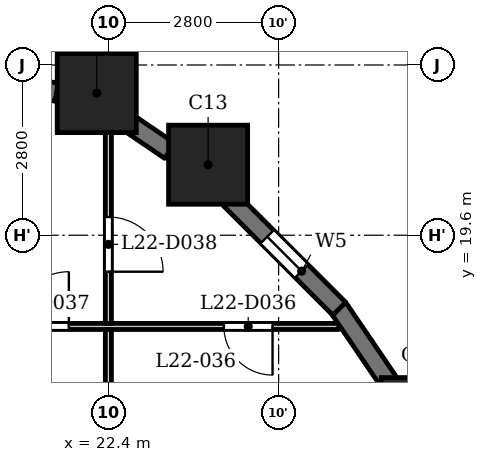
"""IFC4 building model, lengths in metres.
Left out: names, types, materials, properties, quantities, classifications, styles, units other than length and angle.
Written with IfcOpenShell. Run it as: python <this file> out.ifc"""

import sys

from ifc_helpers import new_model, si_unit, direction, frame, frame_2d, origin, origin_2d, place, context, subcontext, project, spatial, rectangle, extrude, element, fill, save


model = new_model("IFC4")
c1 = context("Model", 3, precision=1e-05, world=origin(), true_north=direction((0.0, 1.0)))
c2 = subcontext(c1, "Body", "Model", "MODEL_VIEW")
j1 = project(units=[si_unit("LENGTHUNIT", "METRE"), si_unit("PLANEANGLEUNIT", "RADIAN")], contexts=[c1])
p1 = place(None, origin())
s1 = spatial("IfcSite", under=j1, at=p1, CompositionType="ELEMENT")
p2 = place(p1, origin())
s2 = spatial("IfcBuilding", under=s1, at=p2, CompositionType="ELEMENT")
p3 = place(p2, frame((0.0, 0.0, 90.3)))
s3 = spatial("IfcBuildingStorey", under=s2, at=p3, CompositionType="ELEMENT", Elevation=90.3)
for number, where, z_axis, x_axis in (
    (1, (27.538, 16.609, 0.0), (0.0, 0.0, 1.0), (1.0, 0.0, 0.0)),
    (2, (24.04, 20.76, 0.0), (0.0, 0.0, 1.0), (1.0, 0.0, 0.0)),
    (3, (22.209, 21.938, 0.0), (0.0, 0.0, 1.0), (1.0, 0.0, 0.0)),
):
    element("IfcColumn", number, at=place(p3, frame(where, z_axis=z_axis, x_axis=x_axis)), inside=s3, PredefinedType="COLUMN", context=c2, shape_type="SweptSolid", body=[
        extrude(rectangle(XDim=1.3, YDim=1.3, at=origin_2d()), origin(), (0.0, 0.0, 1.0), 3.5),
    ])
p4 = place(p3, frame((27.082, 17.084, 0.0), z_axis=(0.0, 0.0, 1.0), x_axis=(-0.562010605531, 0.827130025613, 0.0)))
e4 = element("IfcWall", 4, at=p4, inside=s3, PredefinedType="SOLIDWALL", context=c2, shape_type="SweptSolid", body=[
    extrude(rectangle(XDim=1.606, YDim=0.3, at=frame_2d((0.803, 0.0))), origin(), (0.0, 0.0, 1.0), 2.4),
])
p5 = place(p3, frame((26.197, 18.391, 0.0), z_axis=(0.0, 0.0, 1.0), x_axis=(-0.707058908279, 0.707154650853, 0.0)))
e5 = element("IfcWall", 5, at=p5, inside=s3, PredefinedType="SOLIDWALL", context=c2, shape_type="SweptSolid", body=[
    extrude(rectangle(XDim=2.55, YDim=0.3, at=frame_2d((1.275, 0.0))), origin(), (0.0, 0.0, 1.0), 2.4),
])
p6 = place(p5, frame((0.875, 0.0, 0.6)))
e6 = element("IfcOpeningElement", 6, at=p6, cuts=e5, PredefinedType="OPENING", context=c2, shape_type="SweptSolid", body=[
    extrude(rectangle(XDim=0.8, YDim=1.55, at=frame_2d((0.4, 0.775))), frame((0.0, 0.16, 0.0), z_axis=(0.0, -1.0, 0.0), x_axis=(1.0, 0.0, 0.0)), (0.0, 0.0, 1.0), 0.32),
])
p7 = place(p3, frame((23.41, 20.989, 0.0), z_axis=(0.0, 0.0, 1.0), x_axis=(-0.827050703543, 0.562127328787, 0.0)))
e7 = element("IfcWall", 7, at=p7, inside=s3, PredefinedType="SOLIDWALL", context=c2, shape_type="SweptSolid", body=[
    extrude(rectangle(XDim=0.877, YDim=0.3, at=frame_2d((0.438, 0.0))), origin(), (0.0, 0.0, 1.0), 3.2),
])
p8 = place(p3, frame((21.55, 21.952, 0.0), z_axis=(0.0, 0.0, 1.0), x_axis=(-0.982278644094, 0.187426426519, 0.0)))
e8 = element("IfcWall", 8, at=p8, inside=s3, PredefinedType="SOLIDWALL", context=c2, shape_type="SweptSolid", body=[
    extrude(rectangle(XDim=1.606, YDim=0.3, at=frame_2d((0.803, 0.0))), origin(), (0.0, 0.0, 1.0), 2.4),
])
p9 = place(p3, frame((16.875, 18.1, 0.0), z_axis=(0.0, 0.0, 1.0), x_axis=(1.0, 0.0, 0.0)))
e9 = element("IfcWall", 9, at=p9, inside=s3, PredefinedType="PARTITIONING", context=c2, shape_type="SweptSolid", body=[
    extrude(rectangle(XDim=9.315, YDim=0.1, at=frame_2d((4.658, 0.0))), origin(), (0.0, 0.0, 1.0), 3.2),
])
p10 = place(p9, frame((7.425, 0.0, 0.0)))
e10 = element("IfcOpeningElement", 10, at=p10, cuts=e9, PredefinedType="OPENING", context=c2, shape_type="SweptSolid", body=[
    extrude(rectangle(XDim=0.8, YDim=2.1, at=frame_2d((0.4, 1.05))), frame((0.0, 0.06, 0.0), z_axis=(0.0, -1.0, 0.0), x_axis=(1.0, 0.0, 0.0)), (0.0, 0.0, 1.0), 0.12),
])
p11 = place(p9, frame((3.975, 0.0, 0.0)))
e11 = element("IfcOpeningElement", 11, at=p11, cuts=e9, PredefinedType="OPENING", context=c2, shape_type="SweptSolid", body=[
    extrude(rectangle(XDim=0.9, YDim=2.1, at=frame_2d((0.45, 1.05))), frame((0.0, 0.06, 0.0), z_axis=(0.0, -1.0, 0.0), x_axis=(1.0, 0.0, 0.0)), (0.0, 0.0, 1.0), 0.12),
])
p12 = place(p3, frame((22.4, 15.475, 0.0), z_axis=(0.0, 0.0, 1.0), x_axis=(0.0, 1.0, 0.0)))
e12 = element("IfcWall", 12, at=p12, inside=s3, PredefinedType="PARTITIONING", context=c2, shape_type="SweptSolid", body=[
    extrude(rectangle(XDim=2.575, YDim=0.1, at=frame_2d((1.288, 0.0))), origin(), (0.0, 0.0, 1.0), 3.2),
])
p13 = place(p3, frame((22.4, 18.15, 0.0), z_axis=(0.0, 0.0, 1.0), x_axis=(0.0, 1.0, 0.0)))
e13 = element("IfcWall", 13, at=p13, inside=s3, PredefinedType="PARTITIONING", context=c2, shape_type="SweptSolid", body=[
    extrude(rectangle(XDim=3.57, YDim=0.1, at=frame_2d((1.785, 0.0))), origin(), (0.0, 0.0, 1.0), 3.2),
])
p14 = place(p13, frame((0.85, 0.0, 0.0)))
e14 = element("IfcOpeningElement", 14, at=p14, cuts=e13, PredefinedType="OPENING", context=c2, shape_type="SweptSolid", body=[
    extrude(rectangle(XDim=0.9, YDim=2.1, at=frame_2d((0.45, 1.05))), frame((0.0, 0.06, 0.0), z_axis=(0.0, -1.0, 0.0), x_axis=(1.0, 0.0, 0.0)), (0.0, 0.0, 1.0), 0.12),
])
p15 = place(p10, origin())
e15 = element("IfcDoor", 15, at=p15, inside=s3, OperationType="SINGLE_SWING_RIGHT", PredefinedType="DOOR", context=c2, shape_type="SweptSolid", body=[
    extrude(rectangle(XDim=0.8, YDim=2.1, at=frame_2d((0.4, 1.05))), frame((0.0, 0.025, 0.0), z_axis=(0.0, -1.0, 0.0), x_axis=(1.0, 0.0, 0.0)), (0.0, 0.0, 1.0), 0.05),
])
fill(e10, e15)
p16 = place(p11, origin())
e16 = element("IfcDoor", 16, at=p16, inside=s3, OperationType="SINGLE_SWING_LEFT", PredefinedType="DOOR", context=c2, shape_type="SweptSolid", body=[
    extrude(rectangle(XDim=0.9, YDim=2.1, at=frame_2d((0.45, 1.05))), frame((0.0, 0.025, 0.0), z_axis=(0.0, -1.0, 0.0), x_axis=(1.0, 0.0, 0.0)), (0.0, 0.0, 1.0), 0.05),
])
fill(e11, e16)
p17 = place(p14, origin())
e17 = element("IfcDoor", 17, at=p17, inside=s3, OperationType="SINGLE_SWING_LEFT", PredefinedType="DOOR", context=c2, shape_type="SweptSolid", body=[
    extrude(rectangle(XDim=0.9, YDim=2.1, at=frame_2d((0.45, 1.05))), frame((0.0, 0.025, 0.0), z_axis=(0.0, -1.0, 0.0), x_axis=(1.0, 0.0, 0.0)), (0.0, 0.0, 1.0), 0.05),
])
fill(e14, e17)
p18 = place(p6, origin())
e18 = element("IfcWindow", 18, at=p18, inside=s3, PartitioningType="SINGLE_PANEL", PredefinedType="WINDOW", context=c2, shape_type="SweptSolid", body=[
    extrude(rectangle(XDim=0.8, YDim=1.55, at=frame_2d((0.4, 0.775))), frame((0.0, 0.03, 0.0), z_axis=(0.0, -1.0, 0.0), x_axis=(1.0, 0.0, 0.0)), (0.0, 0.0, 1.0), 0.06),
])
fill(e6, e18)
save(model, sys.argv[1])
